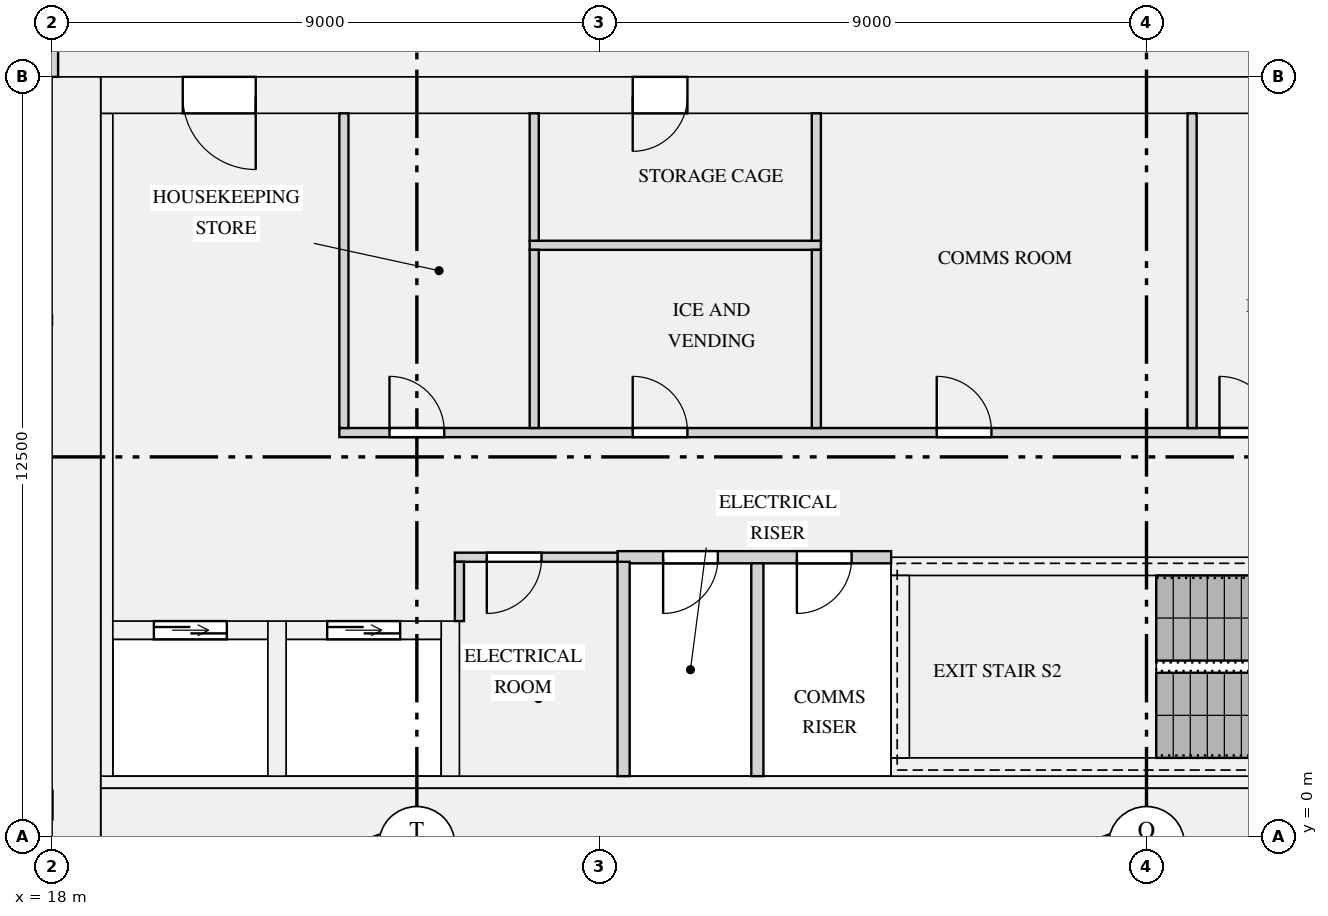
"""IFC4 building model, lengths in metres.
Left out: names, types, materials, properties, quantities, classifications, styles, units other than length and angle.
Written with IfcOpenShell. Run it as: python <this file> out.ifc"""

import sys

from ifc_helpers import new_model, si_unit, direction, frame, frame_2d, origin, place, context, subcontext, project, spatial, rectangle, extrude, element, fill, save


model = new_model("IFC4")
c1 = context("Model", 3, precision=1e-05, world=origin(), true_north=direction((0.0, 1.0)))
c2 = subcontext(c1, "Body", "Model", "MODEL_VIEW")
j1 = project(units=[si_unit("LENGTHUNIT", "METRE"), si_unit("PLANEANGLEUNIT", "RADIAN")], contexts=[c1])
p1 = place(None, origin())
s1 = spatial("IfcSite", under=j1, at=p1, CompositionType="ELEMENT")
p2 = place(p1, origin())
s2 = spatial("IfcBuilding", under=s1, at=p2, CompositionType="ELEMENT")
p3 = place(p2, frame((0.0, 0.0, 111.9)))
s3 = spatial("IfcBuildingStorey", under=s2, at=p3, CompositionType="ELEMENT", Elevation=111.9)
p4 = place(p3, frame((18.4, 0.0, 0.0), z_axis=(0.0, 0.0, 1.0), x_axis=(0.0, 1.0, 0.0)))
e1 = element("IfcWall", 1, at=p4, inside=s3, PredefinedType="SHEAR", context=c2, shape_type="SweptSolid", body=[
    extrude(rectangle(XDim=12.5, YDim=0.8, at=frame_2d((6.25, 0.0))), origin(), (0.0, 0.0, 1.0), 3.15),
])
p5 = place(p3, frame((18.8, 0.4, 0.0), z_axis=(0.0, 0.0, 1.0), x_axis=(1.0, 0.0, 0.0)))
e2 = element("IfcWall", 2, at=p5, inside=s3, PredefinedType="SHEAR", context=c2, shape_type="SweptSolid", body=[
    extrude(rectangle(XDim=34.4, YDim=0.8, at=frame_2d((17.2, 0.0))), origin(), (0.0, 0.0, 1.0), 3.15),
])
p6 = place(p3, frame((18.8, 12.2, 0.0), z_axis=(0.0, 0.0, 1.0), x_axis=(1.0, 0.0, 0.0)))
e3 = element("IfcWall", 3, at=p6, inside=s3, PredefinedType="SHEAR", context=c2, shape_type="SweptSolid", body=[
    extrude(rectangle(XDim=34.4, YDim=0.6, at=frame_2d((17.2, 0.0))), origin(), (0.0, 0.0, 1.0), 3.15),
])
p7 = place(p6, frame((24.375, 0.0, 0.0)))
e4 = element("IfcOpeningElement", 4, at=p7, cuts=e3, PredefinedType="OPENING", context=c2, shape_type="SweptSolid", body=[
    extrude(rectangle(XDim=1.1, YDim=2.1, at=frame_2d((0.55, 1.05))), frame((0.0, 0.31, 0.0), z_axis=(0.0, -1.0, 0.0), x_axis=(1.0, 0.0, 0.0)), (0.0, 0.0, 1.0), 0.62),
])
p8 = place(p6, frame((26.625, 0.0, 0.0)))
e5 = element("IfcOpeningElement", 5, at=p8, cuts=e3, PredefinedType="OPENING", context=c2, shape_type="SweptSolid", body=[
    extrude(rectangle(XDim=1.1, YDim=2.1, at=frame_2d((0.55, 1.05))), frame((0.0, 0.31, 0.0), z_axis=(0.0, -1.0, 0.0), x_axis=(1.0, 0.0, 0.0)), (0.0, 0.0, 1.0), 0.62),
])
p9 = place(p6, frame((28.875, 0.0, 0.0)))
e6 = element("IfcOpeningElement", 6, at=p9, cuts=e3, PredefinedType="OPENING", context=c2, shape_type="SweptSolid", body=[
    extrude(rectangle(XDim=1.1, YDim=2.1, at=frame_2d((0.55, 1.05))), frame((0.0, 0.31, 0.0), z_axis=(0.0, -1.0, 0.0), x_axis=(1.0, 0.0, 0.0)), (0.0, 0.0, 1.0), 0.62),
])
p10 = place(p6, frame((8.75, 0.0, 0.0)))
e7 = element("IfcOpeningElement", 7, at=p10, cuts=e3, PredefinedType="OPENING", context=c2, shape_type="SweptSolid", body=[
    extrude(rectangle(XDim=0.9, YDim=2.1, at=frame_2d((0.45, 1.05))), frame((0.0, 0.31, 0.0), z_axis=(0.0, -1.0, 0.0), x_axis=(1.0, 0.0, 0.0)), (0.0, 0.0, 1.0), 0.62),
])
p11 = place(p6, frame((1.35, 0.0, 0.0)))
e8 = element("IfcOpeningElement", 8, at=p11, cuts=e3, PredefinedType="OPENING", context=c2, shape_type="SweptSolid", body=[
    extrude(rectangle(XDim=1.2, YDim=2.1, at=frame_2d((0.6, 1.05))), frame((0.0, 0.31, 0.0), z_axis=(0.0, -1.0, 0.0), x_axis=(1.0, 0.0, 0.0)), (0.0, 0.0, 1.0), 0.62),
])
p12 = place(p6, frame((31.85, 0.0, 0.0)))
e9 = element("IfcOpeningElement", 9, at=p12, cuts=e3, PredefinedType="OPENING", context=c2, shape_type="SweptSolid", body=[
    extrude(rectangle(XDim=1.2, YDim=2.1, at=frame_2d((0.6, 1.05))), frame((0.0, 0.31, 0.0), z_axis=(0.0, -1.0, 0.0), x_axis=(1.0, 0.0, 0.0)), (0.0, 0.0, 1.0), 0.62),
])
p13 = place(p3, frame((18.9, 1.0, 0.0), z_axis=(0.0, 0.0, 1.0), x_axis=(0.0, 1.0, 0.0)))
e10 = element("IfcWall", 10, at=p13, inside=s3, PredefinedType="SHEAR", context=c2, shape_type="SweptSolid", body=[
    extrude(rectangle(XDim=10.9, YDim=0.2, at=frame_2d((5.45, 0.0))), origin(), (0.0, 0.0, 1.0), 3.15),
])
p14 = place(p3, frame((18.8, 0.9, 0.0), z_axis=(0.0, 0.0, 1.0), x_axis=(1.0, 0.0, 0.0)))
e11 = element("IfcWall", 11, at=p14, inside=s3, PredefinedType="SHEAR", context=c2, shape_type="SweptSolid", body=[
    extrude(rectangle(XDim=34.4, YDim=0.2, at=frame_2d((17.2, 0.0))), origin(), (0.0, 0.0, 1.0), 3.15),
])
p15 = place(p3, frame((19.0, 3.4, 0.0), z_axis=(0.0, 0.0, 1.0), x_axis=(1.0, 0.0, 0.0)))
e12 = element("IfcWall", 12, at=p15, inside=s3, PredefinedType="SHEAR", context=c2, shape_type="SweptSolid", body=[
    extrude(rectangle(XDim=2.55, YDim=0.3, at=frame_2d((1.275, 0.0))), origin(), (0.0, 0.0, 1.0), 3.15),
])
p16 = place(p15, frame((0.675, 0.0, 0.0)))
e13 = element("IfcOpeningElement", 13, at=p16, cuts=e12, PredefinedType="OPENING", context=c2, shape_type="SweptSolid", body=[
    extrude(rectangle(XDim=1.2, YDim=2.1, at=frame_2d((0.6, 1.05))), frame((0.0, 0.16, 0.0), z_axis=(0.0, -1.0, 0.0), x_axis=(1.0, 0.0, 0.0)), (0.0, 0.0, 1.0), 0.32),
])
p17 = place(p3, frame((21.85, 3.4, 0.0), z_axis=(0.0, 0.0, 1.0), x_axis=(1.0, 0.0, 0.0)))
e14 = element("IfcWall", 14, at=p17, inside=s3, PredefinedType="SHEAR", context=c2, shape_type="SweptSolid", body=[
    extrude(rectangle(XDim=2.55, YDim=0.3, at=frame_2d((1.275, 0.0))), origin(), (0.0, 0.0, 1.0), 3.15),
])
p18 = place(p17, frame((0.675, 0.0, 0.0)))
e15 = element("IfcOpeningElement", 15, at=p18, cuts=e14, PredefinedType="OPENING", context=c2, shape_type="SweptSolid", body=[
    extrude(rectangle(XDim=1.2, YDim=2.1, at=frame_2d((0.6, 1.05))), frame((0.0, 0.16, 0.0), z_axis=(0.0, -1.0, 0.0), x_axis=(1.0, 0.0, 0.0)), (0.0, 0.0, 1.0), 0.32),
])
for number, where, z_axis, x_axis in (
    (16, (21.7, 1.0, 0.0), (0.0, 0.0, 1.0), (0.0, 1.0, 0.0)),
    (17, (24.55, 1.0, 0.0), (0.0, 0.0, 1.0), (0.0, 1.0, 0.0)),
):
    element("IfcWall", number, at=place(p3, frame(where, z_axis=z_axis, x_axis=x_axis)), inside=s3, PredefinedType="SHEAR", context=c2, shape_type="SweptSolid", body=[
        extrude(rectangle(XDim=2.55, YDim=0.3, at=frame_2d((1.275, 0.0))), origin(), (0.0, 0.0, 1.0), 3.15),
    ])
p19 = place(p3, frame((31.8, 1.15, 0.0), z_axis=(0.0, 0.0, 1.0), x_axis=(1.0, 0.0, 0.0)))
e18 = element("IfcWall", 18, at=p19, inside=s3, PredefinedType="SHEAR", context=c2, shape_type="SweptSolid", body=[
    extrude(rectangle(XDim=8.4, YDim=0.3, at=frame_2d((4.2, 0.0))), origin(), (0.0, 0.0, 1.0), 3.15),
])
p20 = place(p3, frame((31.8, 4.45, 0.0), z_axis=(0.0, 0.0, 1.0), x_axis=(1.0, 0.0, 0.0)))
e19 = element("IfcWall", 19, at=p20, inside=s3, PredefinedType="SHEAR", context=c2, shape_type="SweptSolid", body=[
    extrude(rectangle(XDim=8.4, YDim=0.3, at=frame_2d((4.2, 0.0))), origin(), (0.0, 0.0, 1.0), 3.15),
])
p21 = place(p20, frame((6.8, 0.0, 0.0)))
e20 = element("IfcOpeningElement", 20, at=p21, cuts=e19, PredefinedType="OPENING", context=c2, shape_type="SweptSolid", body=[
    extrude(rectangle(XDim=1.1, YDim=2.1, at=frame_2d((0.55, 1.05))), frame((0.0, 0.16, 0.0), z_axis=(0.0, -1.0, 0.0), x_axis=(1.0, 0.0, 0.0)), (0.0, 0.0, 1.0), 0.32),
])
p22 = place(p3, frame((31.95, 1.3, 0.0), z_axis=(0.0, 0.0, 1.0), x_axis=(0.0, 1.0, 0.0)))
e21 = element("IfcWall", 21, at=p22, inside=s3, PredefinedType="SHEAR", context=c2, shape_type="SweptSolid", body=[
    extrude(rectangle(XDim=3.0, YDim=0.3, at=frame_2d((1.5, 0.0))), origin(), (0.0, 0.0, 1.0), 3.15),
])
p23 = place(p3, frame((14.05, 0.525, 0.9), z_axis=(0.0, 0.0, 1.0), x_axis=(1.0, 0.0, 0.0)))
e22 = element("IfcWall", 22, at=p23, inside=s3, PredefinedType="SOLIDWALL", context=c2, shape_type="SweptSolid", body=[
    extrude(rectangle(XDim=3.95, YDim=0.45, at=frame_2d((1.975, 0.0))), origin(), (0.0, 0.0, 1.0), 1.93),
])
p24 = place(p23, frame((1.225, 0.0, 0.15)))
e23 = element("IfcOpeningElement", 23, at=p24, cuts=e22, PredefinedType="OPENING", context=c2, shape_type="SweptSolid", body=[
    extrude(rectangle(XDim=1.5, YDim=1.5, at=frame_2d((0.75, 0.75))), frame((0.0, 0.235, 0.0), z_axis=(0.0, -1.0, 0.0), x_axis=(1.0, 0.0, 0.0)), (0.0, 0.0, 1.0), 0.47),
])
p25 = place(p3, frame((27.3, 4.6, 0.0), z_axis=(0.0, 0.0, 1.0), x_axis=(1.0, 0.0, 0.0)))
e24 = element("IfcWall", 24, at=p25, inside=s3, PredefinedType="PARTITIONING", context=c2, shape_type="SweptSolid", body=[
    extrude(rectangle(XDim=4.5, YDim=0.2, at=frame_2d((2.25, 0.0))), origin(), (0.0, 0.0, 1.0), 2.83),
])
p26 = place(p25, frame((0.75, 0.0, 0.0)))
e25 = element("IfcOpeningElement", 25, at=p26, cuts=e24, PredefinedType="OPENING", context=c2, shape_type="SweptSolid", body=[
    extrude(rectangle(XDim=0.9, YDim=2.1, at=frame_2d((0.45, 1.05))), frame((0.0, 0.11, 0.0), z_axis=(0.0, -1.0, 0.0), x_axis=(1.0, 0.0, 0.0)), (0.0, 0.0, 1.0), 0.22),
])
p27 = place(p25, frame((2.95, 0.0, 0.0)))
e26 = element("IfcOpeningElement", 26, at=p27, cuts=e24, PredefinedType="OPENING", context=c2, shape_type="SweptSolid", body=[
    extrude(rectangle(XDim=0.9, YDim=2.1, at=frame_2d((0.45, 1.05))), frame((0.0, 0.11, 0.0), z_axis=(0.0, -1.0, 0.0), x_axis=(1.0, 0.0, 0.0)), (0.0, 0.0, 1.0), 0.22),
])
p28 = place(p3, frame((24.625, 4.6, 0.0), z_axis=(0.0, 0.0, 1.0), x_axis=(1.0, 0.0, 0.0)))
e27 = element("IfcWall", 27, at=p28, inside=s3, PredefinedType="PARTITIONING", context=c2, shape_type="SweptSolid", body=[
    extrude(rectangle(XDim=2.675, YDim=0.15, at=frame_2d((1.337, 0.0))), origin(), (0.0, 0.0, 1.0), 2.83),
])
p29 = place(p28, frame((0.525, 0.0, 0.0)))
e28 = element("IfcOpeningElement", 28, at=p29, cuts=e27, PredefinedType="OPENING", context=c2, shape_type="SweptSolid", body=[
    extrude(rectangle(XDim=0.9, YDim=2.1, at=frame_2d((0.45, 1.05))), frame((0.0, 0.085, 0.0), z_axis=(0.0, -1.0, 0.0), x_axis=(1.0, 0.0, 0.0)), (0.0, 0.0, 1.0), 0.17),
])
p30 = place(p3, frame((22.725, 6.65, 0.0), z_axis=(0.0, 0.0, 1.0), x_axis=(1.0, 0.0, 0.0)))
e29 = element("IfcWall", 29, at=p30, inside=s3, PredefinedType="PARTITIONING", context=c2, shape_type="SweptSolid", body=[
    extrude(rectangle(XDim=19.8, YDim=0.15, at=frame_2d((9.9, 0.0))), origin(), (0.0, 0.0, 1.0), 2.83),
])
p31 = place(p30, frame((0.825, 0.0, 0.0)))
e30 = element("IfcOpeningElement", 30, at=p31, cuts=e29, PredefinedType="OPENING", context=c2, shape_type="SweptSolid", body=[
    extrude(rectangle(XDim=0.9, YDim=2.1, at=frame_2d((0.45, 1.05))), frame((0.0, 0.085, 0.0), z_axis=(0.0, -1.0, 0.0), x_axis=(1.0, 0.0, 0.0)), (0.0, 0.0, 1.0), 0.17),
])
p32 = place(p30, frame((4.825, 0.0, 0.0)))
e31 = element("IfcOpeningElement", 31, at=p32, cuts=e29, PredefinedType="OPENING", context=c2, shape_type="SweptSolid", body=[
    extrude(rectangle(XDim=0.9, YDim=2.1, at=frame_2d((0.45, 1.05))), frame((0.0, 0.085, 0.0), z_axis=(0.0, -1.0, 0.0), x_axis=(1.0, 0.0, 0.0)), (0.0, 0.0, 1.0), 0.17),
])
p33 = place(p30, frame((9.825, 0.0, 0.0)))
e32 = element("IfcOpeningElement", 32, at=p33, cuts=e29, PredefinedType="OPENING", context=c2, shape_type="SweptSolid", body=[
    extrude(rectangle(XDim=0.9, YDim=2.1, at=frame_2d((0.45, 1.05))), frame((0.0, 0.085, 0.0), z_axis=(0.0, -1.0, 0.0), x_axis=(1.0, 0.0, 0.0)), (0.0, 0.0, 1.0), 0.17),
])
p34 = place(p30, frame((14.475, 0.0, 0.0)))
e33 = element("IfcOpeningElement", 33, at=p34, cuts=e29, PredefinedType="OPENING", context=c2, shape_type="SweptSolid", body=[
    extrude(rectangle(XDim=0.9, YDim=2.1, at=frame_2d((0.45, 1.05))), frame((0.0, 0.085, 0.0), z_axis=(0.0, -1.0, 0.0), x_axis=(1.0, 0.0, 0.0)), (0.0, 0.0, 1.0), 0.17),
])
p35 = place(p30, frame((17.825, 0.0, 0.0)))
e34 = element("IfcOpeningElement", 34, at=p35, cuts=e29, PredefinedType="OPENING", context=c2, shape_type="SweptSolid", body=[
    extrude(rectangle(XDim=0.9, YDim=2.1, at=frame_2d((0.45, 1.05))), frame((0.0, 0.085, 0.0), z_axis=(0.0, -1.0, 0.0), x_axis=(1.0, 0.0, 0.0)), (0.0, 0.0, 1.0), 0.17),
])
p36 = place(p3, frame((25.855, 9.73, 0.0), z_axis=(0.0, 0.0, 1.0), x_axis=(1.0, 0.0, 0.0)))
e35 = element("IfcWall", 35, at=p36, inside=s3, PredefinedType="PARTITIONING", context=c2, shape_type="SweptSolid", body=[
    extrude(rectangle(XDim=4.79, YDim=0.15, at=frame_2d((2.395, 0.0))), origin(), (0.0, 0.0, 1.0), 2.83),
])
p37 = place(p3, frame((27.4, 1.0, 0.0), z_axis=(0.0, 0.0, 1.0), x_axis=(0.0, 1.0, 0.0)))
e36 = element("IfcWall", 36, at=p37, inside=s3, PredefinedType="PARTITIONING", context=c2, shape_type="SweptSolid", body=[
    extrude(rectangle(XDim=3.525, YDim=0.2, at=frame_2d((1.762, 0.0))), origin(), (0.0, 0.0, 1.0), 2.83),
])
p38 = place(p3, frame((29.6, 1.0, 0.0), z_axis=(0.0, 0.0, 1.0), x_axis=(0.0, 1.0, 0.0)))
e37 = element("IfcWall", 37, at=p38, inside=s3, PredefinedType="PARTITIONING", context=c2, shape_type="SweptSolid", body=[
    extrude(rectangle(XDim=3.5, YDim=0.2, at=frame_2d((1.75, 0.0))), origin(), (0.0, 0.0, 1.0), 2.83),
])
p39 = place(p3, frame((24.7, 3.55, 0.0), z_axis=(0.0, 0.0, 1.0), x_axis=(0.0, 1.0, 0.0)))
e38 = element("IfcWall", 38, at=p39, inside=s3, PredefinedType="PARTITIONING", context=c2, shape_type="SweptSolid", body=[
    extrude(rectangle(XDim=0.975, YDim=0.15, at=frame_2d((0.487, 0.0))), origin(), (0.0, 0.0, 1.0), 2.83),
])
p40 = place(p3, frame((22.8, 6.725, 0.0), z_axis=(0.0, 0.0, 1.0), x_axis=(0.0, 1.0, 0.0)))
e39 = element("IfcWall", 39, at=p40, inside=s3, PredefinedType="PARTITIONING", context=c2, shape_type="SweptSolid", body=[
    extrude(rectangle(XDim=5.175, YDim=0.15, at=frame_2d((2.587, 0.0))), origin(), (0.0, 0.0, 1.0), 2.83),
])
for number, where, z_axis, x_axis in (
    (40, (25.93, 6.725, 0.0), (0.0, 0.0, 1.0), (0.0, 1.0, 0.0)),
    (41, (30.57, 6.725, 0.0), (0.0, 0.0, 1.0), (0.0, 1.0, 0.0)),
):
    element("IfcWall", number, at=place(p3, frame(where, z_axis=z_axis, x_axis=x_axis)), inside=s3, PredefinedType="PARTITIONING", context=c2, shape_type="SweptSolid", body=[
        extrude(rectangle(XDim=2.93, YDim=0.15, at=frame_2d((1.465, 0.0))), origin(), (0.0, 0.0, 1.0), 2.83),
    ])
p41 = place(p3, frame((36.75, 6.725, 0.0), z_axis=(0.0, 0.0, 1.0), x_axis=(0.0, 1.0, 0.0)))
e42 = element("IfcWall", 42, at=p41, inside=s3, PredefinedType="PARTITIONING", context=c2, shape_type="SweptSolid", body=[
    extrude(rectangle(XDim=5.175, YDim=0.15, at=frame_2d((2.587, 0.0))), origin(), (0.0, 0.0, 1.0), 2.83),
])
for number, where, z_axis, x_axis in (
    (43, (25.93, 9.805, 0.0), (0.0, 0.0, 1.0), (0.0, 1.0, 0.0)),
    (44, (30.57, 9.805, 0.0), (0.0, 0.0, 1.0), (0.0, 1.0, 0.0)),
):
    element("IfcWall", number, at=place(p3, frame(where, z_axis=z_axis, x_axis=x_axis)), inside=s3, PredefinedType="PARTITIONING", context=c2, shape_type="SweptSolid", body=[
        extrude(rectangle(XDim=2.095, YDim=0.15, at=frame_2d((1.047, 0.0))), origin(), (0.0, 0.0, 1.0), 2.83),
    ])
p42 = place(p3, frame((18.0, 12.5, 0.0), z_axis=(0.0, 0.0, 1.0), x_axis=(0.0, 1.0, 0.0)))
e45 = element("IfcWall", 45, at=p42, inside=s3, PredefinedType="PARTITIONING", context=c2, shape_type="SweptSolid", body=[
    extrude(rectangle(XDim=3.4, YDim=0.2, at=frame_2d((1.7, 0.0))), origin(), (0.0, 0.0, 1.0), 2.83),
])
p43 = place(p16, origin())
e46 = element("IfcDoor", 46, at=p43, inside=s3, OperationType="DOUBLE_DOOR_SLIDING", PredefinedType="DOOR", context=c2, shape_type="SweptSolid", body=[
    extrude(rectangle(XDim=1.2, YDim=2.1, at=frame_2d((0.6, 1.05))), frame((0.0, 0.025, 0.0), z_axis=(0.0, -1.0, 0.0), x_axis=(1.0, 0.0, 0.0)), (0.0, 0.0, 1.0), 0.05),
])
fill(e13, e46)
p44 = place(p18, origin())
e47 = element("IfcDoor", 47, at=p44, inside=s3, OperationType="DOUBLE_DOOR_SLIDING", PredefinedType="DOOR", context=c2, shape_type="SweptSolid", body=[
    extrude(rectangle(XDim=1.2, YDim=2.1, at=frame_2d((0.6, 1.05))), frame((0.0, 0.025, 0.0), z_axis=(0.0, -1.0, 0.0), x_axis=(1.0, 0.0, 0.0)), (0.0, 0.0, 1.0), 0.05),
])
fill(e15, e47)
p45 = place(p29, frame((0.9, 0.0, 0.0), z_axis=(0.0, 0.0, 1.0), x_axis=(-1.0, 0.0, 0.0)))
e48 = element("IfcDoor", 48, at=p45, inside=s3, OperationType="SINGLE_SWING_RIGHT", PredefinedType="DOOR", context=c2, shape_type="SweptSolid", body=[
    extrude(rectangle(XDim=0.9, YDim=2.1, at=frame_2d((0.45, 1.05))), frame((0.0, 0.025, 0.0), z_axis=(0.0, -1.0, 0.0), x_axis=(1.0, 0.0, 0.0)), (0.0, 0.0, 1.0), 0.05),
])
fill(e28, e48)
p46 = place(p31, origin())
e49 = element("IfcDoor", 49, at=p46, inside=s3, OperationType="SINGLE_SWING_LEFT", PredefinedType="DOOR", context=c2, shape_type="SweptSolid", body=[
    extrude(rectangle(XDim=0.9, YDim=2.1, at=frame_2d((0.45, 1.05))), frame((0.0, 0.025, 0.0), z_axis=(0.0, -1.0, 0.0), x_axis=(1.0, 0.0, 0.0)), (0.0, 0.0, 1.0), 0.05),
])
fill(e30, e49)
p47 = place(p32, origin())
e50 = element("IfcDoor", 50, at=p47, inside=s3, OperationType="SINGLE_SWING_LEFT", PredefinedType="DOOR", context=c2, shape_type="SweptSolid", body=[
    extrude(rectangle(XDim=0.9, YDim=2.1, at=frame_2d((0.45, 1.05))), frame((0.0, 0.025, 0.0), z_axis=(0.0, -1.0, 0.0), x_axis=(1.0, 0.0, 0.0)), (0.0, 0.0, 1.0), 0.05),
])
fill(e31, e50)
p48 = place(p10, frame((0.9, 0.0, 0.0), z_axis=(0.0, 0.0, 1.0), x_axis=(-1.0, 0.0, 0.0)))
e51 = element("IfcDoor", 51, at=p48, inside=s3, OperationType="SINGLE_SWING_RIGHT", PredefinedType="DOOR", context=c2, shape_type="SweptSolid", body=[
    extrude(rectangle(XDim=0.9, YDim=2.1, at=frame_2d((0.45, 1.05))), frame((0.0, 0.025, 0.0), z_axis=(0.0, -1.0, 0.0), x_axis=(1.0, 0.0, 0.0)), (0.0, 0.0, 1.0), 0.05),
])
fill(e7, e51)
p49 = place(p33, origin())
e52 = element("IfcDoor", 52, at=p49, inside=s3, OperationType="SINGLE_SWING_LEFT", PredefinedType="DOOR", context=c2, shape_type="SweptSolid", body=[
    extrude(rectangle(XDim=0.9, YDim=2.1, at=frame_2d((0.45, 1.05))), frame((0.0, 0.025, 0.0), z_axis=(0.0, -1.0, 0.0), x_axis=(1.0, 0.0, 0.0)), (0.0, 0.0, 1.0), 0.05),
])
fill(e32, e52)
p50 = place(p34, origin())
e53 = element("IfcDoor", 53, at=p50, inside=s3, OperationType="SINGLE_SWING_LEFT", PredefinedType="DOOR", context=c2, shape_type="SweptSolid", body=[
    extrude(rectangle(XDim=0.9, YDim=2.1, at=frame_2d((0.45, 1.05))), frame((0.0, 0.025, 0.0), z_axis=(0.0, -1.0, 0.0), x_axis=(1.0, 0.0, 0.0)), (0.0, 0.0, 1.0), 0.05),
])
fill(e33, e53)
p51 = place(p26, frame((0.9, 0.0, 0.0), z_axis=(0.0, 0.0, 1.0), x_axis=(-1.0, 0.0, 0.0)))
e54 = element("IfcDoor", 54, at=p51, inside=s3, OperationType="SINGLE_SWING_RIGHT", PredefinedType="DOOR", context=c2, shape_type="SweptSolid", body=[
    extrude(rectangle(XDim=0.9, YDim=2.1, at=frame_2d((0.45, 1.05))), frame((0.0, 0.025, 0.0), z_axis=(0.0, -1.0, 0.0), x_axis=(1.0, 0.0, 0.0)), (0.0, 0.0, 1.0), 0.05),
])
fill(e25, e54)
p52 = place(p27, frame((0.9, 0.0, 0.0), z_axis=(0.0, 0.0, 1.0), x_axis=(-1.0, 0.0, 0.0)))
e55 = element("IfcDoor", 55, at=p52, inside=s3, OperationType="SINGLE_SWING_RIGHT", PredefinedType="DOOR", context=c2, shape_type="SweptSolid", body=[
    extrude(rectangle(XDim=0.9, YDim=2.1, at=frame_2d((0.45, 1.05))), frame((0.0, 0.025, 0.0), z_axis=(0.0, -1.0, 0.0), x_axis=(1.0, 0.0, 0.0)), (0.0, 0.0, 1.0), 0.05),
])
fill(e26, e55)
p53 = place(p11, frame((1.2, 0.0, 0.0), z_axis=(0.0, 0.0, 1.0), x_axis=(-1.0, 0.0, 0.0)))
e56 = element("IfcDoor", 56, at=p53, inside=s3, OperationType="SINGLE_SWING_LEFT", PredefinedType="DOOR", context=c2, shape_type="SweptSolid", body=[
    extrude(rectangle(XDim=1.2, YDim=2.1, at=frame_2d((0.6, 1.05))), frame((0.0, 0.025, 0.0), z_axis=(0.0, -1.0, 0.0), x_axis=(1.0, 0.0, 0.0)), (0.0, 0.0, 1.0), 0.05),
])
fill(e8, e56)
save(model, sys.argv[1])
